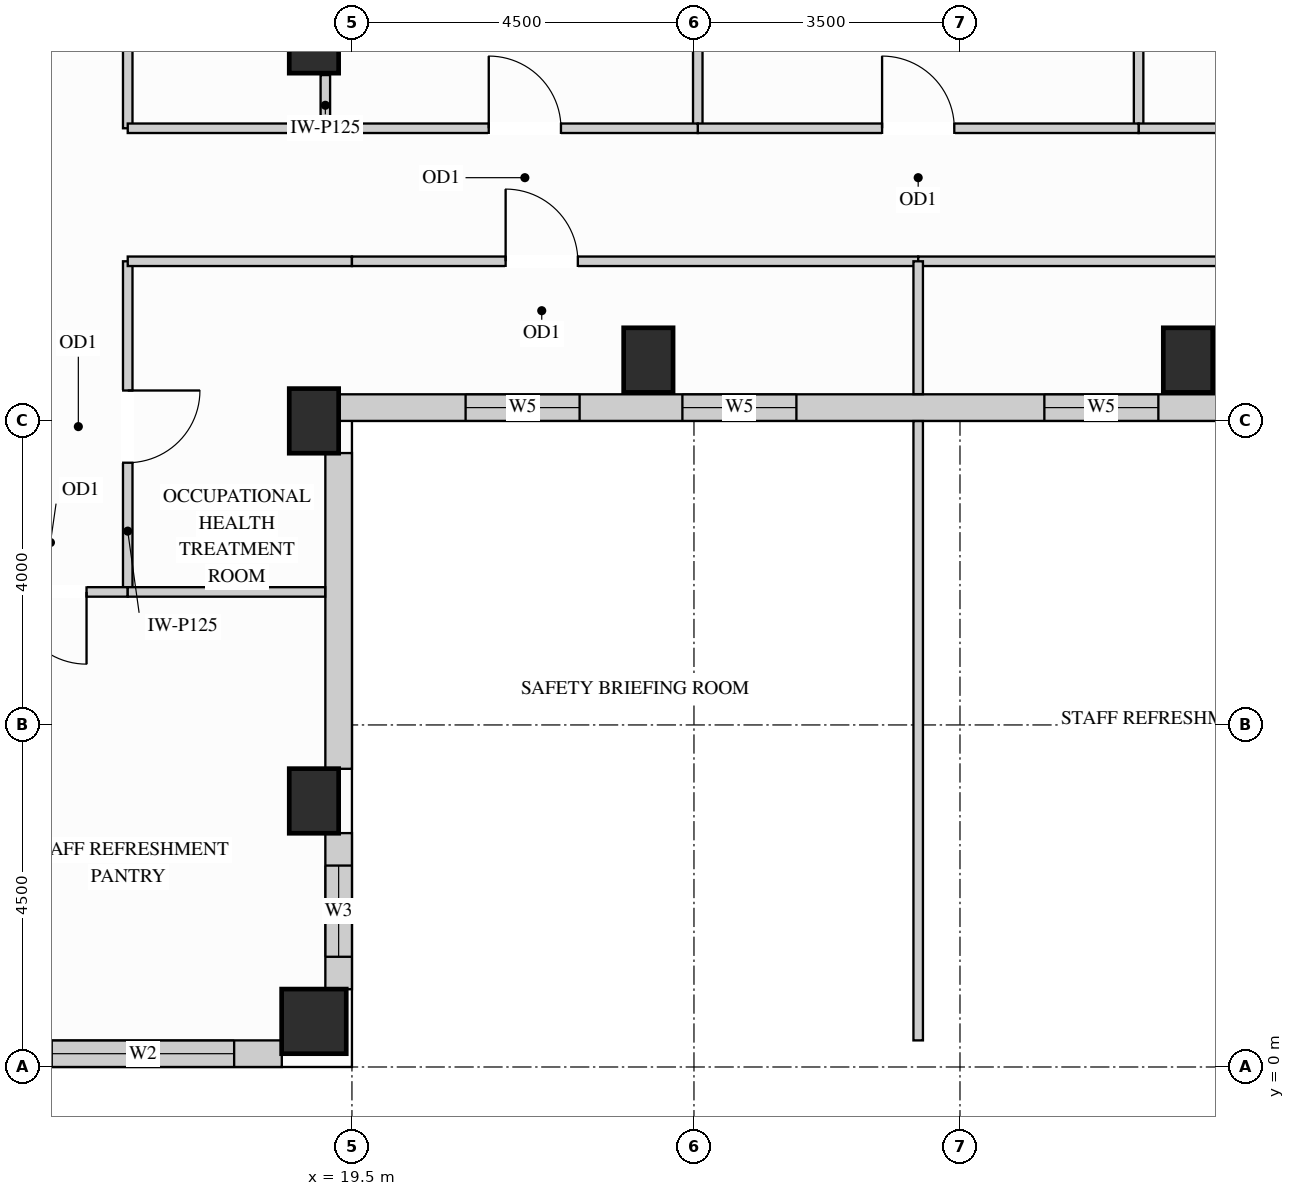
"""IFC4 building model, lengths in metres.
Left out: names, types, materials, properties, quantities, classifications, styles, units other than length and angle.
Written with IfcOpenShell. Run it as: python <this file> out.ifc"""

import sys

from ifc_helpers import new_model, si_unit, direction, frame, frame_2d, origin, origin_2d, place, context, subcontext, project, spatial, rectangle, extrude, source, transform, mapped, element, fill, save


model = new_model("IFC4")
c1 = context("Model", 3, precision=1e-05, world=origin(), true_north=direction((0.0, 1.0)))
c2 = subcontext(c1, "Body", "Model", "MODEL_VIEW")
j1 = project(units=[si_unit("LENGTHUNIT", "METRE"), si_unit("PLANEANGLEUNIT", "RADIAN")], contexts=[c1])
p1 = place(None, origin())
s1 = spatial("IfcSite", under=j1, at=p1, CompositionType="ELEMENT")
p2 = place(p1, origin())
s2 = spatial("IfcBuilding", under=s1, at=p2, CompositionType="ELEMENT")
p3 = place(p2, frame((0.0, 0.0, 226.8)))
s3 = spatial("IfcBuildingStorey", under=s2, at=p3, CompositionType="ELEMENT", Elevation=226.8)
m1 = source(origin(), c2, "Body", "SweptSolid", [
    extrude(rectangle(XDim=0.65, YDim=0.85, at=origin_2d()), origin(), (0.0, 0.0, 1.0), 3.4),
])
for number, where, z_axis, x_axis in (
    (1, (19.0, 13.5, 0.0), (0.0, 0.0, 1.0), (1.0, 0.0, 0.0)),
    (2, (19.0, 3.5, 0.0), (0.0, 0.0, 1.0), (1.0, 0.0, 0.0)),
    (3, (19.0, 8.5, 0.0), (0.0, 0.0, 1.0), (1.0, 0.0, 0.0)),
    (4, (23.4, 9.3, 0.0), (0.0, 0.0, 1.0), (1.0, 0.0, 0.0)),
    (5, (30.5, 9.3, 0.0), (0.0, 0.0, 1.0), (1.0, 0.0, 0.0)),
):
    element("IfcColumn", number, at=place(p3, frame(where, z_axis=z_axis, x_axis=x_axis)), inside=s3, PredefinedType="COLUMN", context=c2, shape_type="MappedRepresentation", body=[
        mapped(m1, transform((0.0, 0.0, 0.0), x_axis=(1.0, 0.0, 0.0), y_axis=(0.0, 1.0, 0.0), z_axis=(0.0, 0.0, 1.0))),
    ])
m2 = source(origin(), c2, "Body", "SweptSolid", [
    extrude(rectangle(XDim=0.85, YDim=0.85, at=origin_2d()), origin(), (0.0, 0.0, 1.0), 3.4),
])
p4 = place(p3, frame((19.0, 0.6, 0.0), z_axis=(0.0, 0.0, 1.0), x_axis=(1.0, 0.0, 0.0)))
e6 = element("IfcColumn", 6, at=p4, inside=s3, PredefinedType="COLUMN", context=c2, shape_type="MappedRepresentation", body=[
    mapped(m2, transform((0.0, 0.0, 0.0), x_axis=(1.0, 0.0, 0.0), y_axis=(0.0, 1.0, 0.0), z_axis=(0.0, 0.0, 1.0))),
])
p5 = place(p3, frame((14.923, 0.175, 0.0), z_axis=(0.0, 0.0, 1.0), x_axis=(1.0, 0.0, 0.0)))
e7 = element("IfcWall", 7, at=p5, inside=s3, PredefinedType="SOLIDWALL", context=c2, shape_type="SweptSolid", body=[
    extrude(rectangle(XDim=3.654, YDim=0.35, at=frame_2d((1.827, 0.0))), origin(), (0.0, 0.0, 1.0), 3.385),
])
p6 = place(p5, frame((0.627, 0.0, 0.78)))
e8 = element("IfcOpeningElement", 8, at=p6, cuts=e7, PredefinedType="OPENING", context=c2, shape_type="SweptSolid", body=[
    extrude(rectangle(XDim=2.4, YDim=2.1, at=frame_2d((1.2, 1.05))), frame((0.0, 0.185, 0.0), z_axis=(0.0, -1.0, 0.0), x_axis=(1.0, 0.0, 0.0)), (0.0, 0.0, 1.0), 0.37),
])
p7 = place(p3, frame((19.325, 1.023, 0.0), z_axis=(0.0, 0.0, 1.0), x_axis=(0.0, 1.0, 0.0)))
e9 = element("IfcWall", 9, at=p7, inside=s3, PredefinedType="SOLIDWALL", context=c2, shape_type="SweptSolid", body=[
    extrude(rectangle(XDim=2.054, YDim=0.35, at=frame_2d((1.027, 0.0))), origin(), (0.0, 0.0, 1.0), 2.619),
])
p8 = place(p7, frame((0.427, 0.0, 0.78)))
e10 = element("IfcOpeningElement", 10, at=p8, cuts=e9, PredefinedType="OPENING", context=c2, shape_type="SweptSolid", body=[
    extrude(rectangle(XDim=1.2, YDim=1.659, at=frame_2d((0.6, 0.83))), frame((0.0, 0.185, 0.0), z_axis=(0.0, -1.0, 0.0), x_axis=(1.0, 0.0, 0.0)), (0.0, 0.0, 1.0), 0.37),
])
m3 = source(origin(), c2, "Body", "SweptSolid", [
    extrude(rectangle(XDim=4.154, YDim=0.35, at=frame_2d((2.077, 0.0))), origin(), (0.0, 0.0, 1.0), 2.619),
])
p9 = place(p3, frame((19.325, 3.923, 0.0), z_axis=(0.0, 0.0, 1.0), x_axis=(0.0, 1.0, 0.0)))
e11 = element("IfcWall", 11, at=p9, inside=s3, PredefinedType="SOLIDWALL", context=c2, shape_type="MappedRepresentation", body=[
    mapped(m3, transform((0.0, 0.0, 0.0), x_axis=(1.0, 0.0, 0.0), y_axis=(0.0, 1.0, 0.0), z_axis=(0.0, 0.0, 1.0))),
])
p10 = place(p3, frame((19.323, 8.675, 0.0), z_axis=(0.0, 0.0, 1.0), x_axis=(1.0, 0.0, 0.0)))
e12 = element("IfcWall", 12, at=p10, inside=s3, PredefinedType="SOLIDWALL", context=c2, shape_type="SweptSolid", body=[
    extrude(rectangle(XDim=15.427, YDim=0.35, at=frame_2d((7.713, 0.0))), origin(), (0.0, 0.0, 1.0), 3.385),
])
p11 = place(p10, frame((1.672, 0.0, 0.78)))
e13 = element("IfcOpeningElement", 13, at=p11, cuts=e12, PredefinedType="OPENING", context=c2, shape_type="SweptSolid", body=[
    extrude(rectangle(XDim=1.5, YDim=2.0, at=frame_2d((0.75, 1.0))), frame((0.0, 0.185, 0.0), z_axis=(0.0, -1.0, 0.0), x_axis=(1.0, 0.0, 0.0)), (0.0, 0.0, 1.0), 0.37),
])
p12 = place(p10, frame((4.525, 0.0, 0.78)))
e14 = element("IfcOpeningElement", 14, at=p12, cuts=e12, PredefinedType="OPENING", context=c2, shape_type="SweptSolid", body=[
    extrude(rectangle(XDim=1.5, YDim=2.0, at=frame_2d((0.75, 1.0))), frame((0.0, 0.185, 0.0), z_axis=(0.0, -1.0, 0.0), x_axis=(1.0, 0.0, 0.0)), (0.0, 0.0, 1.0), 0.37),
])
p13 = place(p10, frame((9.287, 0.0, 0.78)))
e15 = element("IfcOpeningElement", 15, at=p13, cuts=e12, PredefinedType="OPENING", context=c2, shape_type="SweptSolid", body=[
    extrude(rectangle(XDim=1.5, YDim=2.0, at=frame_2d((0.75, 1.0))), frame((0.0, 0.185, 0.0), z_axis=(0.0, -1.0, 0.0), x_axis=(1.0, 0.0, 0.0)), (0.0, 0.0, 1.0), 0.37),
])
p14 = place(p10, frame((12.197, 0.0, 0.78)))
e16 = element("IfcOpeningElement", 16, at=p14, cuts=e12, PredefinedType="OPENING", context=c2, shape_type="SweptSolid", body=[
    extrude(rectangle(XDim=1.5, YDim=2.0, at=frame_2d((0.75, 1.0))), frame((0.0, 0.185, 0.0), z_axis=(0.0, -1.0, 0.0), x_axis=(1.0, 0.0, 0.0)), (0.0, 0.0, 1.0), 0.37),
])
m4 = source(origin(), c2, "Body", "SweptSolid", [
    extrude(rectangle(XDim=0.7, YDim=0.125, at=frame_2d((0.35, 0.0))), origin(), (0.0, 0.0, 1.0), 2.773),
])
p15 = place(p3, frame((19.15, 12.35, 0.0), z_axis=(0.0, 0.0, 1.0), x_axis=(0.0, 1.0, 0.0)))
e17 = element("IfcWall", 17, at=p15, inside=s3, PredefinedType="PARTITIONING", context=c2, shape_type="MappedRepresentation", body=[
    mapped(m4, transform((0.0, 0.0, 0.0), x_axis=(1.0, 0.0, 0.0), y_axis=(0.0, 1.0, 0.0), z_axis=(0.0, 0.0, 1.0))),
])
p16 = place(p3, frame((16.55, 12.35, 0.0), z_axis=(0.0, 0.0, 1.0), x_axis=(0.0, 1.0, 0.0)))
e18 = element("IfcWall", 18, at=p16, inside=s3, PredefinedType="PARTITIONING", context=c2, shape_type="SweptSolid", body=[
    extrude(rectangle(XDim=6.25, YDim=0.125, at=frame_2d((3.125, 0.0))), origin(), (0.0, 0.0, 1.0), 3.385),
])
p17 = place(p16, frame((2.65, 0.0, 0.0)))
e19 = element("IfcOpeningElement", 19, at=p17, cuts=e18, PredefinedType="OPENING", context=c2, shape_type="SweptSolid", body=[
    extrude(rectangle(XDim=0.95, YDim=2.15, at=frame_2d((0.475, 1.075))), frame((0.0, 0.073, 0.0), z_axis=(0.0, -1.0, 0.0), x_axis=(1.0, 0.0, 0.0)), (0.0, 0.0, 1.0), 0.145),
])
p18 = place(p3, frame((16.55, 6.25, 0.0), z_axis=(0.0, 0.0, 1.0), x_axis=(0.0, 1.0, 0.0)))
e20 = element("IfcWall", 20, at=p18, inside=s3, PredefinedType="PARTITIONING", context=c2, shape_type="SweptSolid", body=[
    extrude(rectangle(XDim=4.35, YDim=0.125, at=frame_2d((2.175, 0.0))), origin(), (0.0, 0.0, 1.0), 3.385),
])
p19 = place(p18, frame((1.7, 0.0, 0.0)))
e21 = element("IfcOpeningElement", 21, at=p19, cuts=e20, PredefinedType="OPENING", context=c2, shape_type="SweptSolid", body=[
    extrude(rectangle(XDim=0.95, YDim=2.15, at=frame_2d((0.475, 1.075))), frame((0.0, 0.073, 0.0), z_axis=(0.0, -1.0, 0.0), x_axis=(1.0, 0.0, 0.0)), (0.0, 0.0, 1.0), 0.145),
])
m5 = source(origin(), c2, "Body", "SweptSolid", [
    extrude(rectangle(XDim=3.798, YDim=0.125, at=frame_2d((1.899, 0.0))), origin(), (0.0, 0.0, 1.0), 3.385),
])
for number, where, z_axis, x_axis in (
    (22, (24.05, 12.35, 0.0), (0.0, 0.0, 1.0), (0.0, 1.0, 0.0)),
    (23, (29.85, 12.35, 0.0), (0.0, 0.0, 1.0), (0.0, 1.0, 0.0)),
):
    element("IfcWall", number, at=place(p3, frame(where, z_axis=z_axis, x_axis=x_axis)), inside=s3, PredefinedType="PARTITIONING", context=c2, shape_type="MappedRepresentation", body=[
        mapped(m5, transform((0.0, 0.0, 0.0), x_axis=(1.0, 0.0, 0.0), y_axis=(0.0, 1.0, 0.0), z_axis=(0.0, 0.0, 1.0))),
    ])
p20 = place(p3, frame((29.85, 12.35, 0.0), z_axis=(0.0, 0.0, 1.0), x_axis=(1.0, 0.0, 0.0)))
e24 = element("IfcWall", 24, at=p20, inside=s3, PredefinedType="PARTITIONING", context=c2, shape_type="SweptSolid", body=[
    extrude(rectangle(XDim=4.55, YDim=0.125, at=frame_2d((2.275, 0.0))), origin(), (0.0, 0.0, 1.0), 3.385),
])
p21 = place(p20, frame((1.8, 0.0, 0.0)))
e25 = element("IfcOpeningElement", 25, at=p21, cuts=e24, PredefinedType="OPENING", context=c2, shape_type="SweptSolid", body=[
    extrude(rectangle(XDim=0.95, YDim=2.15, at=frame_2d((0.475, 1.075))), frame((0.0, 0.073, 0.0), z_axis=(0.0, -1.0, 0.0), x_axis=(1.0, 0.0, 0.0)), (0.0, 0.0, 1.0), 0.145),
])
p22 = place(p3, frame((24.05, 12.35, 0.0), z_axis=(0.0, 0.0, 1.0), x_axis=(1.0, 0.0, 0.0)))
e26 = element("IfcWall", 26, at=p22, inside=s3, PredefinedType="PARTITIONING", context=c2, shape_type="SweptSolid", body=[
    extrude(rectangle(XDim=5.8, YDim=0.125, at=frame_2d((2.9, 0.0))), origin(), (0.0, 0.0, 1.0), 3.385),
])
p23 = place(p22, frame((2.425, 0.0, 0.0)))
e27 = element("IfcOpeningElement", 27, at=p23, cuts=e26, PredefinedType="OPENING", context=c2, shape_type="SweptSolid", body=[
    extrude(rectangle(XDim=0.95, YDim=2.15, at=frame_2d((0.475, 1.075))), frame((0.0, 0.073, 0.0), z_axis=(0.0, -1.0, 0.0), x_axis=(1.0, 0.0, 0.0)), (0.0, 0.0, 1.0), 0.145),
])
m6 = source(origin(), c2, "Body", "SweptSolid", [
    extrude(rectangle(XDim=2.95, YDim=0.125, at=frame_2d((1.475, 0.0))), origin(), (0.0, 0.0, 1.0), 3.385),
])
p24 = place(p3, frame((16.55, 12.35, 0.0), z_axis=(0.0, 0.0, 1.0), x_axis=(1.0, 0.0, 0.0)))
e28 = element("IfcWall", 28, at=p24, inside=s3, PredefinedType="PARTITIONING", context=c2, shape_type="MappedRepresentation", body=[
    mapped(m6, transform((0.0, 0.0, 0.0), x_axis=(1.0, 0.0, 0.0), y_axis=(0.0, 1.0, 0.0), z_axis=(0.0, 0.0, 1.0))),
])
p25 = place(p3, frame((19.5, 12.35, 0.0), z_axis=(0.0, 0.0, 1.0), x_axis=(1.0, 0.0, 0.0)))
e29 = element("IfcWall", 29, at=p25, inside=s3, PredefinedType="PARTITIONING", context=c2, shape_type="SweptSolid", body=[
    extrude(rectangle(XDim=4.55, YDim=0.125, at=frame_2d((2.275, 0.0))), origin(), (0.0, 0.0, 1.0), 3.385),
])
p26 = place(p25, frame((1.8, 0.0, 0.0)))
e30 = element("IfcOpeningElement", 30, at=p26, cuts=e29, PredefinedType="OPENING", context=c2, shape_type="SweptSolid", body=[
    extrude(rectangle(XDim=0.95, YDim=2.15, at=frame_2d((0.475, 1.075))), frame((0.0, 0.073, 0.0), z_axis=(0.0, -1.0, 0.0), x_axis=(1.0, 0.0, 0.0)), (0.0, 0.0, 1.0), 0.145),
])
p27 = place(p3, frame((16.55, 10.6, 0.0), z_axis=(0.0, 0.0, 1.0), x_axis=(1.0, 0.0, 0.0)))
e31 = element("IfcWall", 31, at=p27, inside=s3, PredefinedType="PARTITIONING", context=c2, shape_type="MappedRepresentation", body=[
    mapped(m6, transform((0.0, 0.0, 0.0), x_axis=(1.0, 0.0, 0.0), y_axis=(0.0, 1.0, 0.0), z_axis=(0.0, 0.0, 1.0))),
])
p28 = place(p3, frame((19.5, 10.6, 0.0), z_axis=(0.0, 0.0, 1.0), x_axis=(1.0, 0.0, 0.0)))
e32 = element("IfcWall", 32, at=p28, inside=s3, PredefinedType="PARTITIONING", context=c2, shape_type="SweptSolid", body=[
    extrude(rectangle(XDim=7.45, YDim=0.125, at=frame_2d((3.725, 0.0))), origin(), (0.0, 0.0, 1.0), 3.385),
])
p29 = place(p28, frame((2.022, 0.0, 0.0)))
e33 = element("IfcOpeningElement", 33, at=p29, cuts=e32, PredefinedType="OPENING", context=c2, shape_type="SweptSolid", body=[
    extrude(rectangle(XDim=0.95, YDim=2.15, at=frame_2d((0.475, 1.075))), frame((0.0, 0.073, 0.0), z_axis=(0.0, -1.0, 0.0), x_axis=(1.0, 0.0, 0.0)), (0.0, 0.0, 1.0), 0.145),
])
p30 = place(p3, frame((26.95, 10.6, 0.0), z_axis=(0.0, 0.0, 1.0), x_axis=(1.0, 0.0, 0.0)))
e34 = element("IfcWall", 34, at=p30, inside=s3, PredefinedType="PARTITIONING", context=c2, shape_type="SweptSolid", body=[
    extrude(rectangle(XDim=7.45, YDim=0.125, at=frame_2d((3.725, 0.0))), origin(), (0.0, 0.0, 1.0), 3.385),
])
p31 = place(p30, frame((4.478, 0.0, 0.0)))
e35 = element("IfcOpeningElement", 35, at=p31, cuts=e34, PredefinedType="OPENING", context=c2, shape_type="SweptSolid", body=[
    extrude(rectangle(XDim=0.95, YDim=2.15, at=frame_2d((0.475, 1.075))), frame((0.0, 0.073, 0.0), z_axis=(0.0, -1.0, 0.0), x_axis=(1.0, 0.0, 0.0)), (0.0, 0.0, 1.0), 0.145),
])
m7 = source(origin(), c2, "Body", "SweptSolid", [
    extrude(rectangle(XDim=8.148, YDim=0.125, at=frame_2d((4.074, 0.0))), origin(), (0.0, 0.0, 1.0), 3.385),
])
p32 = place(p3, frame((26.95, 0.35, 0.0), z_axis=(0.0, 0.0, 1.0), x_axis=(0.0, 1.0, 0.0)))
e36 = element("IfcWall", 36, at=p32, inside=s3, PredefinedType="PARTITIONING", context=c2, shape_type="MappedRepresentation", body=[
    mapped(m7, transform((0.0, 0.0, 0.0), x_axis=(1.0, 0.0, 0.0), y_axis=(0.0, 1.0, 0.0), z_axis=(0.0, 0.0, 1.0))),
])
m8 = source(origin(), c2, "Body", "SweptSolid", [
    extrude(rectangle(XDim=1.748, YDim=0.125, at=frame_2d((0.874, 0.0))), origin(), (0.0, 0.0, 1.0), 3.385),
])
p33 = place(p3, frame((26.95, 8.852, 0.0), z_axis=(0.0, 0.0, 1.0), x_axis=(0.0, 1.0, 0.0)))
e37 = element("IfcWall", 37, at=p33, inside=s3, PredefinedType="PARTITIONING", context=c2, shape_type="MappedRepresentation", body=[
    mapped(m8, transform((0.0, 0.0, 0.0), x_axis=(1.0, 0.0, 0.0), y_axis=(0.0, 1.0, 0.0), z_axis=(0.0, 0.0, 1.0))),
])
p34 = place(p3, frame((14.516, 6.25, 0.0), z_axis=(0.0, 0.0, 1.0), x_axis=(1.0, 0.0, 0.0)))
e38 = element("IfcWall", 38, at=p34, inside=s3, PredefinedType="PARTITIONING", context=c2, shape_type="SweptSolid", body=[
    extrude(rectangle(XDim=2.034, YDim=0.125, at=frame_2d((1.017, 0.0))), origin(), (0.0, 0.0, 1.0), 2.848),
])
p35 = place(p34, frame((0.542, 0.0, 0.0)))
e39 = element("IfcOpeningElement", 39, at=p35, cuts=e38, PredefinedType="OPENING", context=c2, shape_type="SweptSolid", body=[
    extrude(rectangle(XDim=0.95, YDim=2.15, at=frame_2d((0.475, 1.075))), frame((0.0, 0.073, 0.0), z_axis=(0.0, -1.0, 0.0), x_axis=(1.0, 0.0, 0.0)), (0.0, 0.0, 1.0), 0.145),
])
m9 = source(origin(), c2, "Body", "SweptSolid", [
    extrude(rectangle(XDim=2.598, YDim=0.125, at=frame_2d((1.299, 0.0))), origin(), (0.0, 0.0, 1.0), 2.848),
])
p36 = place(p3, frame((16.55, 6.25, 0.0), z_axis=(0.0, 0.0, 1.0), x_axis=(1.0, 0.0, 0.0)))
e40 = element("IfcWall", 40, at=p36, inside=s3, PredefinedType="PARTITIONING", context=c2, shape_type="MappedRepresentation", body=[
    mapped(m9, transform((0.0, 0.0, 0.0), x_axis=(1.0, 0.0, 0.0), y_axis=(0.0, 1.0, 0.0), z_axis=(0.0, 0.0, 1.0))),
])
m10 = source(origin(), c2, "Body", "SweptSolid", [
    extrude(rectangle(XDim=0.95, YDim=2.15, at=frame_2d((0.475, 1.075))), frame((0.0, 0.025, 0.0), z_axis=(0.0, -1.0, 0.0), x_axis=(1.0, 0.0, 0.0)), (0.0, 0.0, 1.0), 0.05),
])
p37 = place(p19, origin())
e41 = element("IfcDoor", 41, at=p37, inside=s3, OperationType="SINGLE_SWING_RIGHT", PredefinedType="DOOR", context=c2, shape_type="MappedRepresentation", body=[
    mapped(m10, transform((0.0, 0.0, 0.0), x_axis=(1.0, 0.0, 0.0), y_axis=(0.0, 1.0, 0.0), z_axis=(0.0, 0.0, 1.0))),
])
fill(e21, e41)
p38 = place(p35, origin())
e42 = element("IfcDoor", 42, at=p38, inside=s3, OperationType="SINGLE_SWING_RIGHT", PredefinedType="DOOR", context=c2, shape_type="MappedRepresentation", body=[
    mapped(m10, transform((0.0, 0.0, 0.0), x_axis=(1.0, 0.0, 0.0), y_axis=(0.0, 1.0, 0.0), z_axis=(0.0, 0.0, 1.0))),
])
fill(e39, e42)
p39 = place(p23, origin())
e43 = element("IfcDoor", 43, at=p39, inside=s3, OperationType="SINGLE_SWING_LEFT", PredefinedType="DOOR", context=c2, shape_type="MappedRepresentation", body=[
    mapped(m10, transform((0.0, 0.0, 0.0), x_axis=(1.0, 0.0, 0.0), y_axis=(0.0, 1.0, 0.0), z_axis=(0.0, 0.0, 1.0))),
])
fill(e27, e43)
p40 = place(p26, origin())
e44 = element("IfcDoor", 44, at=p40, inside=s3, OperationType="SINGLE_SWING_LEFT", PredefinedType="DOOR", context=c2, shape_type="MappedRepresentation", body=[
    mapped(m10, transform((0.0, 0.0, 0.0), x_axis=(1.0, 0.0, 0.0), y_axis=(0.0, 1.0, 0.0), z_axis=(0.0, 0.0, 1.0))),
])
fill(e30, e44)
p41 = place(p29, origin())
e45 = element("IfcDoor", 45, at=p41, inside=s3, OperationType="SINGLE_SWING_LEFT", PredefinedType="DOOR", context=c2, shape_type="MappedRepresentation", body=[
    mapped(m10, transform((0.0, 0.0, 0.0), x_axis=(1.0, 0.0, 0.0), y_axis=(0.0, 1.0, 0.0), z_axis=(0.0, 0.0, 1.0))),
])
fill(e33, e45)
m11 = source(origin(), c2, "Body", "SweptSolid", [
    extrude(rectangle(XDim=2.4, YDim=2.1, at=frame_2d((1.2, 1.05))), frame((0.0, 0.03, 0.0), z_axis=(0.0, -1.0, 0.0), x_axis=(1.0, 0.0, 0.0)), (0.0, 0.0, 1.0), 0.06),
])
p42 = place(p6, origin())
e46 = element("IfcWindow", 46, at=p42, inside=s3, PartitioningType="SINGLE_PANEL", PredefinedType="WINDOW", context=c2, shape_type="MappedRepresentation", body=[
    mapped(m11, transform((0.0, 0.0, 0.0), x_axis=(1.0, 0.0, 0.0), y_axis=(0.0, 1.0, 0.0), z_axis=(0.0, 0.0, 1.0))),
])
fill(e8, e46)
m12 = source(origin(), c2, "Body", "SweptSolid", [
    extrude(rectangle(XDim=1.2, YDim=1.659, at=frame_2d((0.6, 0.83))), frame((0.0, 0.03, 0.0), z_axis=(0.0, -1.0, 0.0), x_axis=(1.0, 0.0, 0.0)), (0.0, 0.0, 1.0), 0.06),
])
p43 = place(p8, origin())
e47 = element("IfcWindow", 47, at=p43, inside=s3, PartitioningType="SINGLE_PANEL", PredefinedType="WINDOW", context=c2, shape_type="MappedRepresentation", body=[
    mapped(m12, transform((0.0, 0.0, 0.0), x_axis=(1.0, 0.0, 0.0), y_axis=(0.0, 1.0, 0.0), z_axis=(0.0, 0.0, 1.0))),
])
fill(e10, e47)
m13 = source(origin(), c2, "Body", "SweptSolid", [
    extrude(rectangle(XDim=1.5, YDim=2.0, at=frame_2d((0.75, 1.0))), frame((0.0, 0.03, 0.0), z_axis=(0.0, -1.0, 0.0), x_axis=(1.0, 0.0, 0.0)), (0.0, 0.0, 1.0), 0.06),
])
p44 = place(p11, origin())
e48 = element("IfcWindow", 48, at=p44, inside=s3, PartitioningType="SINGLE_PANEL", PredefinedType="WINDOW", context=c2, shape_type="MappedRepresentation", body=[
    mapped(m13, transform((0.0, 0.0, 0.0), x_axis=(1.0, 0.0, 0.0), y_axis=(0.0, 1.0, 0.0), z_axis=(0.0, 0.0, 1.0))),
])
fill(e13, e48)
p45 = place(p12, origin())
e49 = element("IfcWindow", 49, at=p45, inside=s3, PartitioningType="SINGLE_PANEL", PredefinedType="WINDOW", context=c2, shape_type="MappedRepresentation", body=[
    mapped(m13, transform((0.0, 0.0, 0.0), x_axis=(1.0, 0.0, 0.0), y_axis=(0.0, 1.0, 0.0), z_axis=(0.0, 0.0, 1.0))),
])
fill(e14, e49)
p46 = place(p13, origin())
e50 = element("IfcWindow", 50, at=p46, inside=s3, PartitioningType="SINGLE_PANEL", PredefinedType="WINDOW", context=c2, shape_type="MappedRepresentation", body=[
    mapped(m13, transform((0.0, 0.0, 0.0), x_axis=(1.0, 0.0, 0.0), y_axis=(0.0, 1.0, 0.0), z_axis=(0.0, 0.0, 1.0))),
])
fill(e15, e50)
save(model, sys.argv[1])
